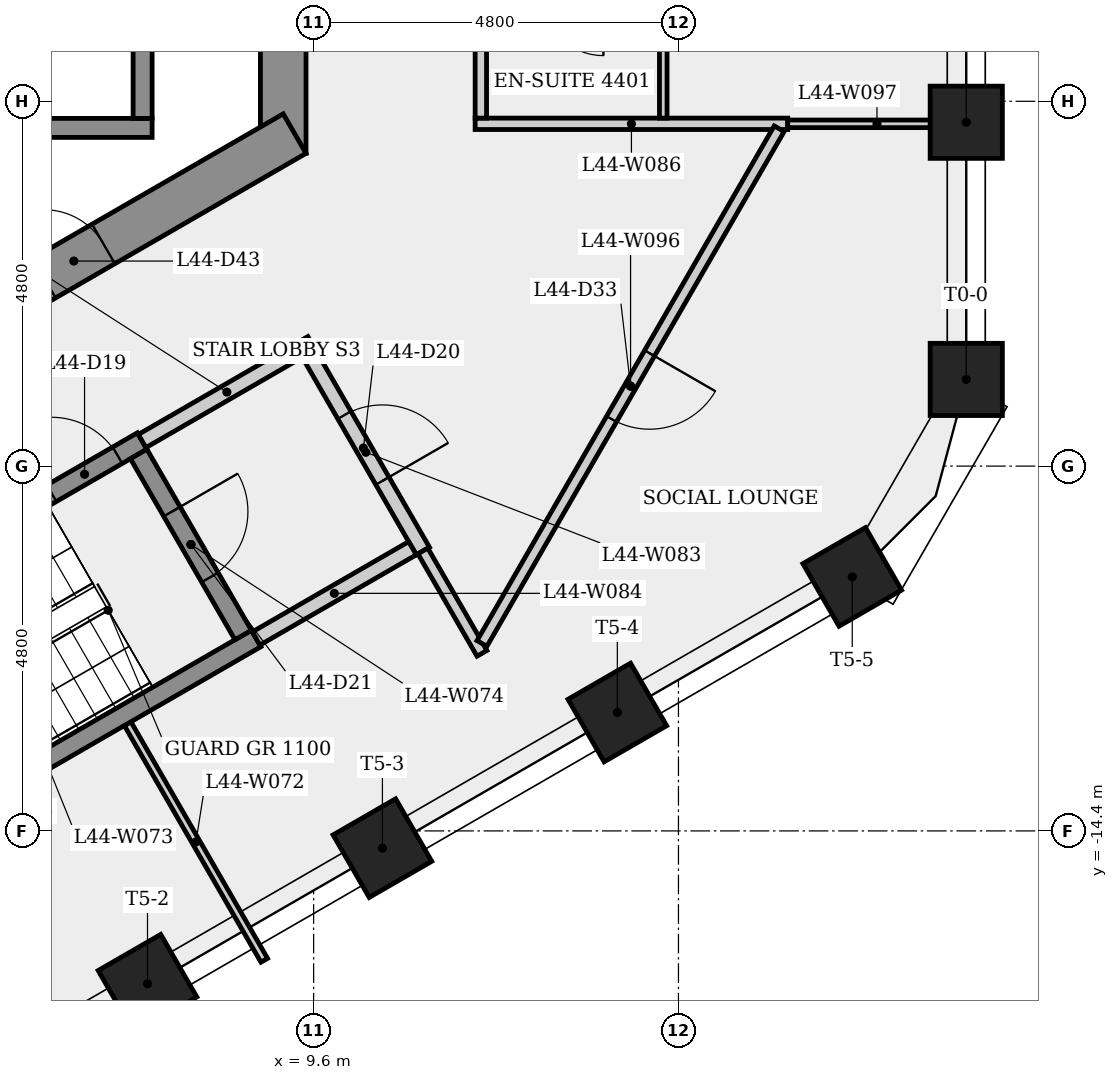
"""IFC4 building model, lengths in metres.
Left out: names, types, materials, properties, quantities, classifications, styles, units other than length and angle.
Written with IfcOpenShell. Run it as: python <this file> out.ifc"""

import sys

from ifc_helpers import new_model, si_unit, direction, frame, frame_2d, origin, origin_2d, place, context, subcontext, project, spatial, rectangle, extrude, element, fill, save


model = new_model("IFC4")
c1 = context("Model", 3, precision=1e-05, world=origin(), true_north=direction((0.0, 1.0)))
c2 = subcontext(c1, "Body", "Model", "MODEL_VIEW")
j1 = project(units=[si_unit("LENGTHUNIT", "METRE"), si_unit("PLANEANGLEUNIT", "RADIAN")], contexts=[c1])
p1 = place(None, origin())
s1 = spatial("IfcSite", under=j1, at=p1, CompositionType="ELEMENT")
p2 = place(p1, origin())
s2 = spatial("IfcBuilding", under=s1, at=p2, CompositionType="ELEMENT")
p3 = place(p2, frame((0.0, 0.0, 166.3)))
s3 = spatial("IfcBuildingStorey", under=s2, at=p3, CompositionType="ELEMENT", Elevation=166.3)
p4 = place(p3, frame((9.2, -5.485, 0.0), z_axis=(0.0, 0.0, 1.0), x_axis=(0.0, 1.0, 0.0)))
e1 = element("IfcWall", 1, at=p4, inside=s3, PredefinedType="SHEAR", context=c2, shape_type="SweptSolid", body=[
    extrude(rectangle(XDim=10.97, YDim=0.6, at=frame_2d((5.485, 0.0))), origin(), (0.0, 0.0, 1.0), 3.4),
])
p5 = place(p4, frame((4.685, 0.0, 0.0)))
e2 = element("IfcOpeningElement", 2, at=p5, cuts=e1, PredefinedType="OPENING", context=c2, shape_type="SweptSolid", body=[
    extrude(rectangle(XDim=1.6, YDim=2.1, at=frame_2d((0.8, 1.05))), frame((0.0, 0.31, 0.0), z_axis=(0.0, -1.0, 0.0), x_axis=(1.0, 0.0, 0.0)), (0.0, 0.0, 1.0), 0.62),
])
p6 = place(p3, frame((-0.15, -10.71, 0.0), z_axis=(0.0, 0.0, 1.0), x_axis=(0.866023993627, 0.500002442456, 0.0)))
e3 = element("IfcWall", 3, at=p6, inside=s3, PredefinedType="SHEAR", context=c2, shape_type="SweptSolid", body=[
    extrude(rectangle(XDim=10.97, YDim=0.6, at=frame_2d((5.485, 0.0))), origin(), (0.0, 0.0, 1.0), 3.4),
])
p7 = place(p6, frame((7.166, 0.0, 0.0)))
e4 = element("IfcOpeningElement", 4, at=p7, cuts=e3, PredefinedType="OPENING", context=c2, shape_type="SweptSolid", body=[
    extrude(rectangle(XDim=0.9, YDim=2.1, at=frame_2d((0.45, 1.05))), frame((0.0, 0.31, 0.0), z_axis=(0.0, -1.0, 0.0), x_axis=(1.0, 0.0, 0.0)), (0.0, 0.0, 1.0), 0.62),
])
for number, where, z_axis, x_axis in (
    (5, (18.187, -8.459, 0.0), (0.0, 0.0, 1.0), (1.0, 0.0, 0.0)),
    (6, (18.187, -5.076, 0.0), (0.0, 0.0, 1.0), (1.0, 0.0, 0.0)),
    (7, (7.414, -16.411, 0.0), (0.0, 0.0, 1.0), (0.5, -0.866, 0.0)),
    (8, (10.505, -14.626, 0.0), (0.0, 0.0, 1.0), (0.5, -0.866, 0.0)),
    (9, (13.596, -12.842, 0.0), (0.0, 0.0, 1.0), (0.5, -0.866, 0.0)),
    (10, (16.687, -11.058, 0.0), (0.0, 0.0, 1.0), (0.5, -0.866, 0.0)),
):
    element("IfcColumn", number, at=place(p3, frame(where, z_axis=z_axis, x_axis=x_axis)), inside=s3, PredefinedType="COLUMN", context=c2, shape_type="SweptSolid", body=[
        extrude(rectangle(XDim=0.95, YDim=0.95, at=origin_2d()), origin(), (0.0, 0.0, 1.0), 3.4),
    ])
p8 = place(p3, frame((1.585, -12.595, 0.0), z_axis=(0.0, 0.0, 1.0), x_axis=(0.866036417653, 0.499980922934, 0.0)))
e11 = element("IfcWall", 11, at=p8, inside=s3, PredefinedType="SHEAR", context=c2, shape_type="SweptSolid", body=[
    extrude(rectangle(XDim=6.65, YDim=0.25, at=frame_2d((3.325, 0.0))), origin(), (0.0, 0.0, 1.0), 3.05),
])
p9 = place(p8, frame((5.275, 0.0, 0.0)))
e12 = element("IfcOpeningElement", 12, at=p9, cuts=e11, PredefinedType="OPENING", context=c2, shape_type="SweptSolid", body=[
    extrude(rectangle(XDim=1.0, YDim=2.1, at=frame_2d((0.5, 1.05))), frame((0.0, 0.135, 0.0), z_axis=(0.0, -1.0, 0.0), x_axis=(1.0, 0.0, 0.0)), (0.0, 0.0, 1.0), 0.27),
])
p10 = place(p3, frame((2.575, -5.15, 0.0), z_axis=(0.0, 0.0, 1.0), x_axis=(1.0, 0.0, 0.0)))
e13 = element("IfcWall", 13, at=p10, inside=s3, PredefinedType="SHEAR", context=c2, shape_type="SweptSolid", body=[
    extrude(rectangle(XDim=4.9, YDim=0.25, at=frame_2d((2.45, 0.0))), origin(), (0.0, 0.0, 1.0), 3.05),
])
p11 = place(p3, frame((7.153, -12.989, 0.0), z_axis=(0.0, 0.0, 1.0), x_axis=(0.500002649256, -0.86602387423, 0.0)))
e14 = element("IfcWall", 14, at=p11, inside=s3, PredefinedType="PARTITIONING", context=c2, shape_type="SweptSolid", body=[
    extrude(rectangle(XDim=3.595, YDim=0.1, at=frame_2d((1.798, 0.0))), origin(), (0.0, 0.0, 1.0), 3.05),
])
p12 = place(p3, frame((3.301, -15.068, 0.0), z_axis=(0.0, 0.0, 1.0), x_axis=(0.866035036182, 0.499983315828, 0.0)))
e15 = element("IfcWall", 15, at=p12, inside=s3, PredefinedType="SHEAR", context=c2, shape_type="SweptSolid", body=[
    extrude(rectangle(XDim=6.4, YDim=0.25, at=frame_2d((3.2, 0.0))), origin(), (0.0, 0.0, 1.0), 3.05),
])
p13 = place(p3, frame((7.298, -9.441, 0.0), z_axis=(0.0, 0.0, 1.0), x_axis=(0.500034990121, -0.866005201286, 0.0)))
e16 = element("IfcWall", 16, at=p13, inside=s3, PredefinedType="SHEAR", context=c2, shape_type="SweptSolid", body=[
    extrude(rectangle(XDim=2.75, YDim=0.25, at=frame_2d((1.375, 0.0))), origin(), (0.0, 0.0, 1.0), 3.05),
])
p14 = place(p13, frame((0.875, 0.0, 0.0)))
e17 = element("IfcOpeningElement", 17, at=p14, cuts=e16, PredefinedType="OPENING", context=c2, shape_type="SweptSolid", body=[
    extrude(rectangle(XDim=1.0, YDim=2.1, at=frame_2d((0.5, 1.05))), frame((0.0, 0.135, 0.0), z_axis=(0.0, -1.0, 0.0), x_axis=(1.0, 0.0, 0.0)), (0.0, 0.0, 1.0), 0.27),
])
p15 = place(p3, frame((7.344, -9.27, 0.0), z_axis=(0.0, 0.0, 1.0), x_axis=(0.866005588531, 0.500034319456, 0.0)))
e18 = element("IfcWall", 18, at=p15, inside=s3, PredefinedType="PARTITIONING", context=c2, shape_type="SweptSolid", body=[
    extrude(rectangle(XDim=2.575, YDim=0.2, at=frame_2d((1.288, 0.0))), origin(), (0.0, 0.0, 1.0), 3.05),
])
p16 = place(p3, frame((7.35, -1.925, 0.0), z_axis=(0.0, 0.0, 1.0), x_axis=(0.0, -1.0, 0.0)))
e19 = element("IfcWall", 19, at=p16, inside=s3, PredefinedType="SHEAR", context=c2, shape_type="SweptSolid", body=[
    extrude(rectangle(XDim=3.1, YDim=0.25, at=frame_2d((1.55, 0.0))), origin(), (0.0, 0.0, 1.0), 3.4),
])
p17 = place(p3, frame((9.537, -8.119, 0.0), z_axis=(0.0, 0.0, 1.0), x_axis=(0.499990139034, -0.866031096941, 0.0)))
e20 = element("IfcWall", 20, at=p17, inside=s3, PredefinedType="PARTITIONING", context=c2, shape_type="SweptSolid", body=[
    extrude(rectangle(XDim=3.0, YDim=0.2, at=frame_2d((1.5, 0.0))), origin(), (0.0, 0.0, 1.0), 3.05),
])
p18 = place(p17, frame((0.935, 0.0, 0.0)))
e21 = element("IfcOpeningElement", 21, at=p18, cuts=e20, PredefinedType="OPENING", context=c2, shape_type="SweptSolid", body=[
    extrude(rectangle(XDim=1.0, YDim=2.1, at=frame_2d((0.5, 1.05))), frame((0.0, 0.11, 0.0), z_axis=(0.0, -1.0, 0.0), x_axis=(1.0, 0.0, 0.0)), (0.0, 0.0, 1.0), 0.22),
])
p19 = place(p3, frame((10.901, -10.681, 0.0), z_axis=(0.0, 0.0, 1.0), x_axis=(-0.866007538022, -0.500030943131, 0.0)))
e22 = element("IfcWall", 22, at=p19, inside=s3, PredefinedType="PARTITIONING", context=c2, shape_type="SweptSolid", body=[
    extrude(rectangle(XDim=2.375, YDim=0.2, at=frame_2d((1.188, 0.0))), origin(), (0.0, 0.0, 1.0), 3.05),
])
p20 = place(p3, frame((11.815, -12.064, 0.0), z_axis=(0.0, 0.0, 1.0), x_axis=(-0.499921796684, 0.866070549782, 0.0)))
e23 = element("IfcWall", 23, at=p20, inside=s3, PredefinedType="PARTITIONING", context=c2, shape_type="SweptSolid", body=[
    extrude(rectangle(XDim=1.555, YDim=0.15, at=frame_2d((0.777, 0.0))), origin(), (0.0, 0.0, 1.0), 3.05),
])
p21 = place(p3, frame((11.725, -5.096, 0.0), z_axis=(0.0, 0.0, 1.0), x_axis=(1.0, 0.0, 0.0)))
e24 = element("IfcWall", 24, at=p21, inside=s3, PredefinedType="PARTITIONING", context=c2, shape_type="SweptSolid", body=[
    extrude(rectangle(XDim=4.113, YDim=0.15, at=frame_2d((2.056, 0.0))), origin(), (0.0, 0.0, 1.0), 3.05),
])
p22 = place(p3, frame((11.8, -5.021, 0.0), z_axis=(0.0, 0.0, 1.0), x_axis=(0.0, 1.0, 0.0)))
e25 = element("IfcWall", 25, at=p22, inside=s3, PredefinedType="PARTITIONING", context=c2, shape_type="SweptSolid", body=[
    extrude(rectangle(XDim=10.193, YDim=0.15, at=frame_2d((5.096, 0.0))), origin(), (0.0, 0.0, 1.0), 3.05),
])
p23 = place(p22, frame((2.022, 0.0, 0.0)))
e26 = element("IfcOpeningElement", 26, at=p23, cuts=e25, PredefinedType="OPENING", context=c2, shape_type="SweptSolid", body=[
    extrude(rectangle(XDim=0.9, YDim=2.1, at=frame_2d((0.45, 1.05))), frame((0.0, 0.085, 0.0), z_axis=(0.0, -1.0, 0.0), x_axis=(1.0, 0.0, 0.0)), (0.0, 0.0, 1.0), 0.17),
])
p24 = place(p22, frame((6.22, 0.0, 0.0)))
e27 = element("IfcOpeningElement", 27, at=p24, cuts=e25, PredefinedType="OPENING", context=c2, shape_type="SweptSolid", body=[
    extrude(rectangle(XDim=1.0, YDim=2.1, at=frame_2d((0.5, 1.05))), frame((0.0, 0.085, 0.0), z_axis=(0.0, -1.0, 0.0), x_axis=(1.0, 0.0, 0.0)), (0.0, 0.0, 1.0), 0.17),
])
p25 = place(p3, frame((14.2, -5.021, 0.0), z_axis=(0.0, 0.0, 1.0), x_axis=(0.0, 1.0, 0.0)))
e28 = element("IfcWall", 28, at=p25, inside=s3, PredefinedType="PARTITIONING", context=c2, shape_type="SweptSolid", body=[
    extrude(rectangle(XDim=1.672, YDim=0.1, at=frame_2d((0.836, 0.0))), origin(), (0.0, 0.0, 1.0), 3.05),
])
p26 = place(p3, frame((15.725, -5.161, 0.0), z_axis=(0.0, 0.0, 1.0), x_axis=(-0.500030520673, -0.866007781949, 0.0)))
e29 = element("IfcWall", 29, at=p26, inside=s3, PredefinedType="PARTITIONING", context=c2, shape_type="SweptSolid", body=[
    extrude(rectangle(XDim=7.82, YDim=0.15, at=frame_2d((3.91, 0.0))), origin(), (0.0, 0.0, 1.0), 3.05),
])
p27 = place(p26, frame((3.41, 0.0, 0.0)))
e30 = element("IfcOpeningElement", 30, at=p27, cuts=e29, PredefinedType="OPENING", context=c2, shape_type="SweptSolid", body=[
    extrude(rectangle(XDim=1.0, YDim=2.1, at=frame_2d((0.5, 1.05))), frame((0.0, 0.085, 0.0), z_axis=(0.0, -1.0, 0.0), x_axis=(1.0, 0.0, 0.0)), (0.0, 0.0, 1.0), 0.17),
])
p28 = place(p3, frame((18.187, -5.096, 0.0), z_axis=(0.0, 0.0, 1.0), x_axis=(-1.0, 0.0, 0.0)))
e31 = element("IfcWall", 31, at=p28, inside=s3, PredefinedType="PARTITIONING", context=c2, shape_type="SweptSolid", body=[
    extrude(rectangle(XDim=2.349, YDim=0.1, at=frame_2d((1.175, 0.0))), origin(), (0.0, 0.0, 1.0), 3.05),
])
p29 = place(p9, origin())
e32 = element("IfcDoor", 32, at=p29, inside=s3, OperationType="SINGLE_SWING_LEFT", PredefinedType="DOOR", context=c2, shape_type="SweptSolid", body=[
    extrude(rectangle(XDim=1.0, YDim=2.1, at=frame_2d((0.5, 1.05))), frame((0.0, 0.025, 0.0), z_axis=(0.0, -1.0, 0.0), x_axis=(1.0, 0.0, 0.0)), (0.0, 0.0, 1.0), 0.05),
])
fill(e12, e32)
p30 = place(p18, origin())
e33 = element("IfcDoor", 33, at=p30, inside=s3, OperationType="SINGLE_SWING_RIGHT", PredefinedType="DOOR", context=c2, shape_type="SweptSolid", body=[
    extrude(rectangle(XDim=1.0, YDim=2.1, at=frame_2d((0.5, 1.05))), frame((0.0, 0.025, 0.0), z_axis=(0.0, -1.0, 0.0), x_axis=(1.0, 0.0, 0.0)), (0.0, 0.0, 1.0), 0.05),
])
fill(e21, e33)
p31 = place(p14, origin())
e34 = element("IfcDoor", 34, at=p31, inside=s3, OperationType="SINGLE_SWING_LEFT", PredefinedType="DOOR", context=c2, shape_type="SweptSolid", body=[
    extrude(rectangle(XDim=1.0, YDim=2.1, at=frame_2d((0.5, 1.05))), frame((0.0, 0.025, 0.0), z_axis=(0.0, -1.0, 0.0), x_axis=(1.0, 0.0, 0.0)), (0.0, 0.0, 1.0), 0.05),
])
fill(e17, e34)
p32 = place(p27, origin())
e35 = element("IfcDoor", 35, at=p32, inside=s3, OperationType="SINGLE_SWING_LEFT", PredefinedType="DOOR", context=c2, shape_type="SweptSolid", body=[
    extrude(rectangle(XDim=1.0, YDim=2.1, at=frame_2d((0.5, 1.05))), frame((0.0, 0.025, 0.0), z_axis=(0.0, -1.0, 0.0), x_axis=(1.0, 0.0, 0.0)), (0.0, 0.0, 1.0), 0.05),
])
fill(e30, e35)
p33 = place(p7, origin())
e36 = element("IfcDoor", 36, at=p33, inside=s3, OperationType="SINGLE_SWING_LEFT", PredefinedType="DOOR", context=c2, shape_type="SweptSolid", body=[
    extrude(rectangle(XDim=0.9, YDim=2.1, at=frame_2d((0.45, 1.05))), frame((0.0, 0.025, 0.0), z_axis=(0.0, -1.0, 0.0), x_axis=(1.0, 0.0, 0.0)), (0.0, 0.0, 1.0), 0.05),
])
fill(e4, e36)
save(model, sys.argv[1])
